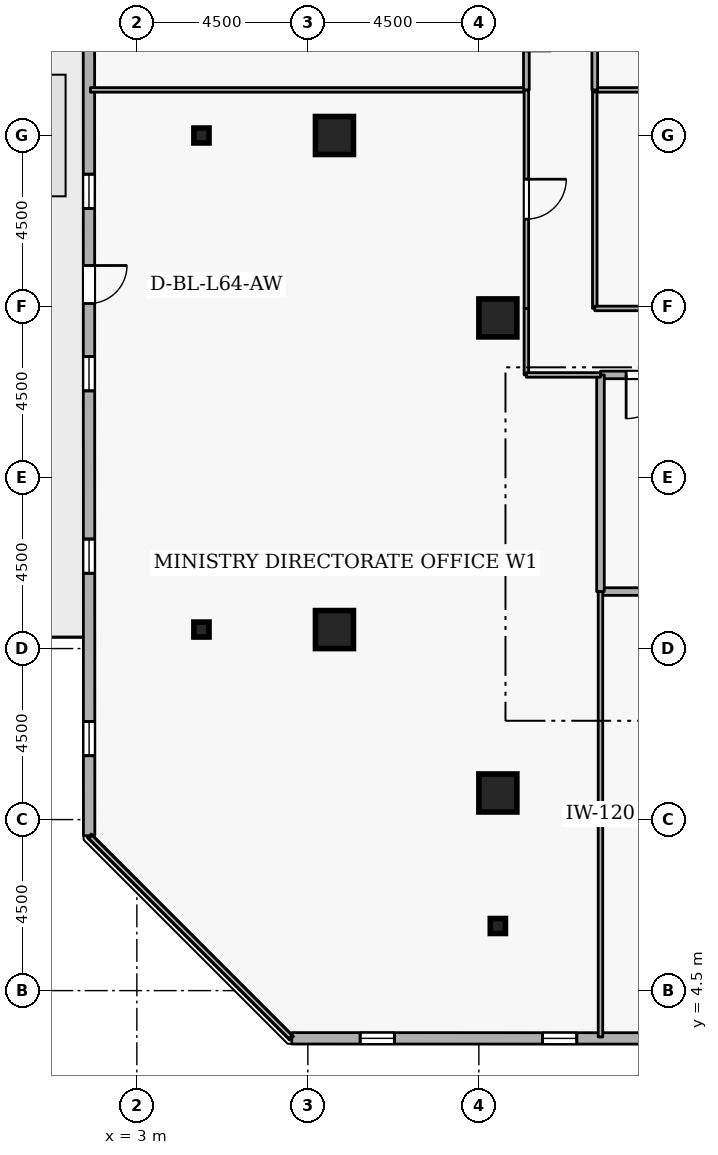
"""IFC4 building model, lengths in metres.
Left out: names, types, materials, properties, quantities, classifications, styles, units other than length and angle.
Written with IfcOpenShell. Run it as: python <this file> out.ifc"""

import sys

from ifc_helpers import new_model, si_unit, direction, frame, frame_2d, origin, origin_2d, place, context, subcontext, project, spatial, rectangle, i_section, extrude, element, fill, save


model = new_model("IFC4")
c1 = context("Model", 3, precision=1e-05, world=origin(), true_north=direction((0.0, 1.0)))
c2 = subcontext(c1, "Body", "Model", "MODEL_VIEW")
j1 = project(units=[si_unit("LENGTHUNIT", "METRE"), si_unit("PLANEANGLEUNIT", "RADIAN")], contexts=[c1])
p1 = place(None, origin())
s1 = spatial("IfcSite", under=j1, at=p1, CompositionType="ELEMENT")
p2 = place(p1, origin())
s2 = spatial("IfcBuilding", under=s1, at=p2, CompositionType="ELEMENT")
p3 = place(p2, frame((0.0, 0.0, 240.3)))
s3 = spatial("IfcBuildingStorey", under=s2, at=p3, CompositionType="ELEMENT", Elevation=240.3)
for number, where, z_axis, x_axis in (
    (1, (12.5, 9.7, 0.0), (0.0, 0.0, 1.0), (1.0, 0.0, 0.0)),
    (2, (8.2, 14.0, 0.0), (0.0, 0.0, 1.0), (1.0, 0.0, 0.0)),
    (3, (8.2, 27.0, 0.0), (0.0, 0.0, 1.0), (1.0, 0.0, 0.0)),
    (4, (12.5, 22.2, 0.0), (0.0, 0.0, 1.0), (1.0, 0.0, 0.0)),
):
    element("IfcColumn", number, at=place(p3, frame(where, z_axis=z_axis, x_axis=x_axis)), inside=s3, PredefinedType="COLUMN", context=c2, shape_type="SweptSolid", body=[
        extrude(rectangle(XDim=1.0, YDim=1.0, at=origin_2d()), origin(), (0.0, 0.0, 1.0), 3.6),
    ])
for number, where, z_axis, x_axis in (
    (5, (12.5, 6.2, 0.0), (0.0, 0.0, 1.0), (1.0, 0.0, 0.0)),
    (6, (4.7, 14.0, 0.0), (0.0, 0.0, 1.0), (1.0, 0.0, 0.0)),
    (7, (4.7, 27.0, 0.0), (0.0, 0.0, 1.0), (1.0, 0.0, 0.0)),
):
    element("IfcColumn", number, at=place(p3, frame(where, z_axis=z_axis, x_axis=x_axis)), inside=s3, PredefinedType="COLUMN", context=c2, shape_type="SweptSolid", body=[
        extrude(i_section(OverallWidth=0.399, OverallDepth=0.394, WebThickness=0.023, FlangeThickness=0.037, FilletRadius=0.015, at=origin_2d()), origin(), (0.0, 0.0, 1.0), 3.6),
    ])
p4 = place(p3, frame((7.076, 3.244, 0.0), z_axis=(0.0, 0.0, 1.0), x_axis=(0.999999963872, -0.000268805477, 0.0)))
e8 = element("IfcWall", 8, at=p4, inside=s3, PredefinedType="STANDARD", context=c2, shape_type="SweptSolid", body=[
    extrude(rectangle(XDim=33.605, YDim=0.3, at=frame_2d((16.802, 0.0))), origin(), (0.0, 0.0, 1.0), 2.7),
])
p5 = place(p4, frame((1.8, 0.0, 0.72)))
e9 = element("IfcOpeningElement", 9, at=p5, cuts=e8, PredefinedType="OPENING", context=c2, shape_type="SweptSolid", body=[
    extrude(rectangle(XDim=0.9, YDim=1.75, at=frame_2d((0.45, 0.875))), frame((0.0, 0.16, 0.0), z_axis=(0.0, -1.0, 0.0), x_axis=(1.0, 0.0, 0.0)), (0.0, 0.0, 1.0), 0.32),
])
p6 = place(p4, frame((6.6, 0.0, 0.72)))
e10 = element("IfcOpeningElement", 10, at=p6, cuts=e8, PredefinedType="OPENING", context=c2, shape_type="SweptSolid", body=[
    extrude(rectangle(XDim=0.9, YDim=1.75, at=frame_2d((0.45, 0.875))), frame((0.0, 0.16, 0.0), z_axis=(0.0, -1.0, 0.0), x_axis=(1.0, 0.0, 0.0)), (0.0, 0.0, 1.0), 0.32),
])
p7 = place(p4, frame((11.4, 0.0, 0.72)))
e11 = element("IfcOpeningElement", 11, at=p7, cuts=e8, PredefinedType="OPENING", context=c2, shape_type="SweptSolid", body=[
    extrude(rectangle(XDim=0.9, YDim=1.75, at=frame_2d((0.45, 0.875))), frame((0.0, 0.16, 0.0), z_axis=(0.0, -1.0, 0.0), x_axis=(1.0, 0.0, 0.0)), (0.0, 0.0, 1.0), 0.32),
])
p8 = place(p4, frame((16.2, 0.0, 0.72)))
e12 = element("IfcOpeningElement", 12, at=p8, cuts=e8, PredefinedType="OPENING", context=c2, shape_type="SweptSolid", body=[
    extrude(rectangle(XDim=0.9, YDim=1.75, at=frame_2d((0.45, 0.875))), frame((0.0, 0.16, 0.0), z_axis=(0.0, -1.0, 0.0), x_axis=(1.0, 0.0, 0.0)), (0.0, 0.0, 1.0), 0.32),
])
p9 = place(p4, frame((21.0, 0.0, 0.72)))
e13 = element("IfcOpeningElement", 13, at=p9, cuts=e8, PredefinedType="OPENING", context=c2, shape_type="SweptSolid", body=[
    extrude(rectangle(XDim=0.9, YDim=1.75, at=frame_2d((0.45, 0.875))), frame((0.0, 0.16, 0.0), z_axis=(0.0, -1.0, 0.0), x_axis=(1.0, 0.0, 0.0)), (0.0, 0.0, 1.0), 0.32),
])
p10 = place(p4, frame((30.6, 0.0, 0.72)))
e14 = element("IfcOpeningElement", 14, at=p10, cuts=e8, PredefinedType="OPENING", context=c2, shape_type="SweptSolid", body=[
    extrude(rectangle(XDim=0.9, YDim=1.75, at=frame_2d((0.45, 0.875))), frame((0.0, 0.16, 0.0), z_axis=(0.0, -1.0, 0.0), x_axis=(1.0, 0.0, 0.0)), (0.0, 0.0, 1.0), 0.32),
])
p11 = place(p3, frame((1.735, 42.181, 0.0), z_axis=(0.0, 0.0, 1.0), x_axis=(0.000268805477, -0.999999963872, 0.0)))
e15 = element("IfcWall", 15, at=p11, inside=s3, PredefinedType="STANDARD", context=c2, shape_type="SweptSolid", body=[
    extrude(rectangle(XDim=33.605, YDim=0.3, at=frame_2d((16.802, 0.0))), origin(), (0.0, 0.0, 1.0), 2.7),
])
p12 = place(p11, frame((18.603, 0.0, 0.0)))
e16 = element("IfcOpeningElement", 16, at=p12, cuts=e15, PredefinedType="OPENING", context=c2, shape_type="SweptSolid", body=[
    extrude(rectangle(XDim=1.0, YDim=2.08, at=frame_2d((0.5, 1.04))), frame((0.0, 0.16, 0.0), z_axis=(0.0, -1.0, 0.0), x_axis=(1.0, 0.0, 0.0)), (0.0, 0.0, 1.0), 0.32),
])
p13 = place(p11, frame((1.8, 0.0, 0.72)))
e17 = element("IfcOpeningElement", 17, at=p13, cuts=e15, PredefinedType="OPENING", context=c2, shape_type="SweptSolid", body=[
    extrude(rectangle(XDim=0.9, YDim=1.75, at=frame_2d((0.45, 0.875))), frame((0.0, 0.16, 0.0), z_axis=(0.0, -1.0, 0.0), x_axis=(1.0, 0.0, 0.0)), (0.0, 0.0, 1.0), 0.32),
])
p14 = place(p11, frame((6.6, 0.0, 0.72)))
e18 = element("IfcOpeningElement", 18, at=p14, cuts=e15, PredefinedType="OPENING", context=c2, shape_type="SweptSolid", body=[
    extrude(rectangle(XDim=0.9, YDim=1.75, at=frame_2d((0.45, 0.875))), frame((0.0, 0.16, 0.0), z_axis=(0.0, -1.0, 0.0), x_axis=(1.0, 0.0, 0.0)), (0.0, 0.0, 1.0), 0.32),
])
p15 = place(p11, frame((11.4, 0.0, 0.72)))
e19 = element("IfcOpeningElement", 19, at=p15, cuts=e15, PredefinedType="OPENING", context=c2, shape_type="SweptSolid", body=[
    extrude(rectangle(XDim=0.9, YDim=1.75, at=frame_2d((0.45, 0.875))), frame((0.0, 0.16, 0.0), z_axis=(0.0, -1.0, 0.0), x_axis=(1.0, 0.0, 0.0)), (0.0, 0.0, 1.0), 0.32),
])
p16 = place(p11, frame((16.2, 0.0, 0.72)))
e20 = element("IfcOpeningElement", 20, at=p16, cuts=e15, PredefinedType="OPENING", context=c2, shape_type="SweptSolid", body=[
    extrude(rectangle(XDim=0.9, YDim=1.75, at=frame_2d((0.45, 0.875))), frame((0.0, 0.16, 0.0), z_axis=(0.0, -1.0, 0.0), x_axis=(1.0, 0.0, 0.0)), (0.0, 0.0, 1.0), 0.32),
])
p17 = place(p11, frame((21.0, 0.0, 0.72)))
e21 = element("IfcOpeningElement", 21, at=p17, cuts=e15, PredefinedType="OPENING", context=c2, shape_type="SweptSolid", body=[
    extrude(rectangle(XDim=0.9, YDim=1.75, at=frame_2d((0.45, 0.875))), frame((0.0, 0.16, 0.0), z_axis=(0.0, -1.0, 0.0), x_axis=(1.0, 0.0, 0.0)), (0.0, 0.0, 1.0), 0.32),
])
p18 = place(p11, frame((25.8, 0.0, 0.72)))
e22 = element("IfcOpeningElement", 22, at=p18, cuts=e15, PredefinedType="OPENING", context=c2, shape_type="SweptSolid", body=[
    extrude(rectangle(XDim=0.9, YDim=1.75, at=frame_2d((0.45, 0.875))), frame((0.0, 0.16, 0.0), z_axis=(0.0, -1.0, 0.0), x_axis=(1.0, 0.0, 0.0)), (0.0, 0.0, 1.0), 0.32),
])
p19 = place(p11, frame((30.6, 0.0, 0.72)))
e23 = element("IfcOpeningElement", 23, at=p19, cuts=e15, PredefinedType="OPENING", context=c2, shape_type="SweptSolid", body=[
    extrude(rectangle(XDim=0.9, YDim=1.75, at=frame_2d((0.45, 0.875))), frame((0.0, 0.16, 0.0), z_axis=(0.0, -1.0, 0.0), x_axis=(1.0, 0.0, 0.0)), (0.0, 0.0, 1.0), 0.32),
])
p20 = place(p3, frame((15.2, 15.0, 0.0), z_axis=(0.0, 0.0, 1.0), x_axis=(1.0, 0.0, 0.0)))
e24 = element("IfcWall", 24, at=p20, inside=s3, PredefinedType="STANDARD", context=c2, shape_type="SweptSolid", body=[
    extrude(rectangle(XDim=2.5, YDim=0.2, at=frame_2d((1.25, 0.0))), origin(), (0.0, 0.0, 1.0), 3.34),
])
p21 = place(p3, frame((17.7, 20.7, 0.0), z_axis=(0.0, 0.0, 1.0), x_axis=(-1.0, 0.0, 0.0)))
e25 = element("IfcWall", 25, at=p21, inside=s3, PredefinedType="STANDARD", context=c2, shape_type="SweptSolid", body=[
    extrude(rectangle(XDim=2.5, YDim=0.2, at=frame_2d((1.25, 0.0))), origin(), (0.0, 0.0, 1.0), 3.34),
])
p22 = place(p21, frame((0.675, 0.0, 0.0)))
e26 = element("IfcOpeningElement", 26, at=p22, cuts=e25, PredefinedType="OPENING", context=c2, shape_type="SweptSolid", body=[
    extrude(rectangle(XDim=1.15, YDim=2.1, at=frame_2d((0.575, 1.05))), frame((0.0, 0.11, 0.0), z_axis=(0.0, -1.0, 0.0), x_axis=(1.0, 0.0, 0.0)), (0.0, 0.0, 1.0), 0.22),
])
p23 = place(p3, frame((15.2, 20.7, 0.0), z_axis=(0.0, 0.0, 1.0), x_axis=(0.0, -1.0, 0.0)))
e27 = element("IfcWall", 27, at=p23, inside=s3, PredefinedType="STANDARD", context=c2, shape_type="SweptSolid", body=[
    extrude(rectangle(XDim=5.7, YDim=0.2, at=frame_2d((2.85, 0.0))), origin(), (0.0, 0.0, 1.0), 3.34),
])
p24 = place(p3, frame((13.25, 22.45, 0.0), z_axis=(0.0, 0.0, 1.0), x_axis=(0.0, -1.0, 0.0)))
e28 = element("IfcWall", 28, at=p24, inside=s3, PredefinedType="PARTITIONING", context=c2, shape_type="SweptSolid", body=[
    extrude(rectangle(XDim=1.75, YDim=0.12, at=frame_2d((0.875, 0.0))), origin(), (0.0, 0.0, 1.0), 3.34),
])
p25 = place(p3, frame((13.25, 20.7, 0.0), z_axis=(0.0, 0.0, 1.0), x_axis=(1.0, 0.0, 0.0)))
e29 = element("IfcWall", 29, at=p25, inside=s3, PredefinedType="PARTITIONING", context=c2, shape_type="SweptSolid", body=[
    extrude(rectangle(XDim=1.95, YDim=0.12, at=frame_2d((0.975, 0.0))), origin(), (0.0, 0.0, 1.0), 3.34),
])
p26 = place(p3, frame((15.2, 15.0, 0.0), z_axis=(0.0, 0.0, 1.0), x_axis=(0.0, -1.0, 0.0)))
e30 = element("IfcWall", 30, at=p26, inside=s3, PredefinedType="PARTITIONING", context=c2, shape_type="SweptSolid", body=[
    extrude(rectangle(XDim=11.72, YDim=0.12, at=frame_2d((5.86, 0.0))), origin(), (0.0, 0.0, 1.0), 3.34),
])
p27 = place(p3, frame((7.044, 3.28, 0.0), z_axis=(0.0, 0.0, 1.0), x_axis=(-0.707106781187, 0.707106781187, 0.0)))
e31 = element("IfcWall", 31, at=p27, inside=s3, PredefinedType="PARTITIONING", context=c2, shape_type="SweptSolid", body=[
    extrude(rectangle(XDim=7.444, YDim=0.12, at=frame_2d((3.722, 0.0))), origin(), (0.0, 0.0, 1.0), 3.34),
])
p28 = place(p3, frame((1.78, 28.2, 0.0), z_axis=(0.0, 0.0, 1.0), x_axis=(1.0, 0.0, 0.0)))
e32 = element("IfcWall", 32, at=p28, inside=s3, PredefinedType="PARTITIONING", context=c2, shape_type="SweptSolid", body=[
    extrude(rectangle(XDim=11.47, YDim=0.12, at=frame_2d((5.735, 0.0))), origin(), (0.0, 0.0, 1.0), 3.34),
])
p29 = place(p3, frame((13.25, 28.2, 0.0), z_axis=(0.0, 0.0, 1.0), x_axis=(0.0, -1.0, 0.0)))
e33 = element("IfcWall", 33, at=p29, inside=s3, PredefinedType="PARTITIONING", context=c2, shape_type="SweptSolid", body=[
    extrude(rectangle(XDim=5.75, YDim=0.12, at=frame_2d((2.875, 0.0))), origin(), (0.0, 0.0, 1.0), 3.34),
])
p30 = place(p29, frame((2.35, 0.0, 0.0)))
e34 = element("IfcOpeningElement", 34, at=p30, cuts=e33, PredefinedType="OPENING", context=c2, shape_type="SweptSolid", body=[
    extrude(rectangle(XDim=1.05, YDim=2.1, at=frame_2d((0.525, 1.05))), frame((0.0, 0.07, 0.0), z_axis=(0.0, -1.0, 0.0), x_axis=(1.0, 0.0, 0.0)), (0.0, 0.0, 1.0), 0.14),
])
p31 = place(p3, frame((13.25, 31.55, 0.0), z_axis=(0.0, 0.0, 1.0), x_axis=(0.0, -1.0, 0.0)))
e35 = element("IfcWall", 35, at=p31, inside=s3, PredefinedType="PARTITIONING", context=c2, shape_type="SweptSolid", body=[
    extrude(rectangle(XDim=3.35, YDim=0.15, at=frame_2d((1.675, 0.0))), origin(), (0.0, 0.0, 1.0), 3.34),
])
p32 = place(p31, frame((1.025, 0.0, 0.0)))
e36 = element("IfcOpeningElement", 36, at=p32, cuts=e35, PredefinedType="OPENING", context=c2, shape_type="SweptSolid", body=[
    extrude(rectangle(XDim=1.3, YDim=2.12, at=frame_2d((0.65, 1.06))), frame((0.0, 0.085, 0.0), z_axis=(0.0, -1.0, 0.0), x_axis=(1.0, 0.0, 0.0)), (0.0, 0.0, 1.0), 0.17),
])
p33 = place(p3, frame((15.05, 22.45, 0.0), z_axis=(0.0, 0.0, 1.0), x_axis=(0.0, 1.0, 0.0)))
e37 = element("IfcWall", 37, at=p33, inside=s3, PredefinedType="PARTITIONING", context=c2, shape_type="SweptSolid", body=[
    extrude(rectangle(XDim=5.75, YDim=0.12, at=frame_2d((2.875, 0.0))), origin(), (0.0, 0.0, 1.0), 3.34),
])
p34 = place(p3, frame((15.05, 28.2, 0.0), z_axis=(0.0, 0.0, 1.0), x_axis=(1.0, 0.0, 0.0)))
e38 = element("IfcWall", 38, at=p34, inside=s3, PredefinedType="PARTITIONING", context=c2, shape_type="SweptSolid", body=[
    extrude(rectangle(XDim=5.85, YDim=0.12, at=frame_2d((2.925, 0.0))), origin(), (0.0, 0.0, 1.0), 3.34),
])
p35 = place(p3, frame((20.9, 22.45, 0.0), z_axis=(0.0, 0.0, 1.0), x_axis=(-1.0, 0.0, 0.0)))
e39 = element("IfcWall", 39, at=p35, inside=s3, PredefinedType="PARTITIONING", context=c2, shape_type="SweptSolid", body=[
    extrude(rectangle(XDim=5.85, YDim=0.12, at=frame_2d((2.925, 0.0))), origin(), (0.0, 0.0, 1.0), 3.34),
])
p36 = place(p35, frame((2.45, 0.0, 0.0)))
e40 = element("IfcOpeningElement", 40, at=p36, cuts=e39, PredefinedType="OPENING", context=c2, shape_type="SweptSolid", body=[
    extrude(rectangle(XDim=0.95, YDim=2.1, at=frame_2d((0.475, 1.05))), frame((0.0, 0.07, 0.0), z_axis=(0.0, -1.0, 0.0), x_axis=(1.0, 0.0, 0.0)), (0.0, 0.0, 1.0), 0.14),
])
p37 = place(p3, frame((15.05, 28.2, 0.0), z_axis=(0.0, 0.0, 1.0), x_axis=(0.0, 1.0, 0.0)))
e41 = element("IfcWall", 41, at=p37, inside=s3, PredefinedType="PARTITIONING", context=c2, shape_type="SweptSolid", body=[
    extrude(rectangle(XDim=3.35, YDim=0.15, at=frame_2d((1.675, 0.0))), origin(), (0.0, 0.0, 1.0), 3.34),
])
p38 = place(p5, origin())
e42 = element("IfcWindow", 42, at=p38, inside=s3, PartitioningType="SINGLE_PANEL", PredefinedType="WINDOW", context=c2, shape_type="SweptSolid", body=[
    extrude(rectangle(XDim=0.9, YDim=1.75, at=frame_2d((0.45, 0.875))), frame((0.0, 0.03, 0.0), z_axis=(0.0, -1.0, 0.0), x_axis=(1.0, 0.0, 0.0)), (0.0, 0.0, 1.0), 0.06),
])
fill(e9, e42)
p39 = place(p6, origin())
e43 = element("IfcWindow", 43, at=p39, inside=s3, PartitioningType="SINGLE_PANEL", PredefinedType="WINDOW", context=c2, shape_type="SweptSolid", body=[
    extrude(rectangle(XDim=0.9, YDim=1.75, at=frame_2d((0.45, 0.875))), frame((0.0, 0.03, 0.0), z_axis=(0.0, -1.0, 0.0), x_axis=(1.0, 0.0, 0.0)), (0.0, 0.0, 1.0), 0.06),
])
fill(e10, e43)
p40 = place(p12, origin())
e44 = element("IfcDoor", 44, at=p40, inside=s3, OperationType="SINGLE_SWING_LEFT", PredefinedType="DOOR", context=c2, shape_type="SweptSolid", body=[
    extrude(rectangle(XDim=1.0, YDim=2.08, at=frame_2d((0.5, 1.04))), frame((0.0, 0.025, 0.0), z_axis=(0.0, -1.0, 0.0), x_axis=(1.0, 0.0, 0.0)), (0.0, 0.0, 1.0), 0.05),
])
fill(e16, e44)
p41 = place(p16, origin())
e45 = element("IfcWindow", 45, at=p41, inside=s3, PartitioningType="SINGLE_PANEL", PredefinedType="WINDOW", context=c2, shape_type="SweptSolid", body=[
    extrude(rectangle(XDim=0.9, YDim=1.75, at=frame_2d((0.45, 0.875))), frame((0.0, 0.03, 0.0), z_axis=(0.0, -1.0, 0.0), x_axis=(1.0, 0.0, 0.0)), (0.0, 0.0, 1.0), 0.06),
])
fill(e20, e45)
p42 = place(p17, origin())
e46 = element("IfcWindow", 46, at=p42, inside=s3, PartitioningType="SINGLE_PANEL", PredefinedType="WINDOW", context=c2, shape_type="SweptSolid", body=[
    extrude(rectangle(XDim=0.9, YDim=1.75, at=frame_2d((0.45, 0.875))), frame((0.0, 0.03, 0.0), z_axis=(0.0, -1.0, 0.0), x_axis=(1.0, 0.0, 0.0)), (0.0, 0.0, 1.0), 0.06),
])
fill(e21, e46)
p43 = place(p18, origin())
e47 = element("IfcWindow", 47, at=p43, inside=s3, PartitioningType="SINGLE_PANEL", PredefinedType="WINDOW", context=c2, shape_type="SweptSolid", body=[
    extrude(rectangle(XDim=0.9, YDim=1.75, at=frame_2d((0.45, 0.875))), frame((0.0, 0.03, 0.0), z_axis=(0.0, -1.0, 0.0), x_axis=(1.0, 0.0, 0.0)), (0.0, 0.0, 1.0), 0.06),
])
fill(e22, e47)
p44 = place(p19, origin())
e48 = element("IfcWindow", 48, at=p44, inside=s3, PartitioningType="SINGLE_PANEL", PredefinedType="WINDOW", context=c2, shape_type="SweptSolid", body=[
    extrude(rectangle(XDim=0.9, YDim=1.75, at=frame_2d((0.45, 0.875))), frame((0.0, 0.03, 0.0), z_axis=(0.0, -1.0, 0.0), x_axis=(1.0, 0.0, 0.0)), (0.0, 0.0, 1.0), 0.06),
])
fill(e23, e48)
p45 = place(p22, origin())
e49 = element("IfcDoor", 49, at=p45, inside=s3, OperationType="SINGLE_SWING_RIGHT", PredefinedType="DOOR", context=c2, shape_type="SweptSolid", body=[
    extrude(rectangle(XDim=1.15, YDim=2.1, at=frame_2d((0.575, 1.05))), frame((0.0, 0.025, 0.0), z_axis=(0.0, -1.0, 0.0), x_axis=(1.0, 0.0, 0.0)), (0.0, 0.0, 1.0), 0.05),
])
fill(e26, e49)
p46 = place(p30, origin())
e50 = element("IfcDoor", 50, at=p46, inside=s3, OperationType="SINGLE_SWING_LEFT", PredefinedType="DOOR", context=c2, shape_type="SweptSolid", body=[
    extrude(rectangle(XDim=1.05, YDim=2.1, at=frame_2d((0.525, 1.05))), frame((0.0, 0.025, 0.0), z_axis=(0.0, -1.0, 0.0), x_axis=(1.0, 0.0, 0.0)), (0.0, 0.0, 1.0), 0.05),
])
fill(e34, e50)
save(model, sys.argv[1])
